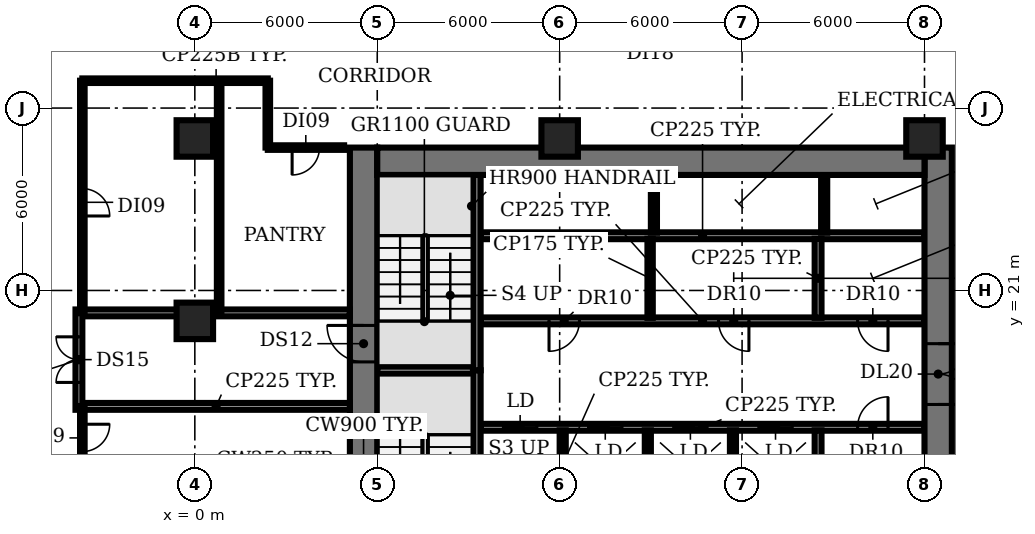
"""IFC4 building model, lengths in metres.
Left out: names, types, materials, properties, quantities, classifications, styles, units other than length and angle.
Written with IfcOpenShell. Run it as: python <this file> out.ifc"""

import sys

from ifc_helpers import new_model, si_unit, direction, frame, frame_2d, origin, origin_2d, place, context, subcontext, project, spatial, rectangle, extrude, element, fill, save


model = new_model("IFC4")
c1 = context("Model", 3, precision=1e-05, world=origin(), true_north=direction((0.0, 1.0)))
c2 = subcontext(c1, "Body", "Model", "MODEL_VIEW")
j1 = project(units=[si_unit("LENGTHUNIT", "METRE"), si_unit("PLANEANGLEUNIT", "RADIAN")], contexts=[c1])
p1 = place(None, origin())
s1 = spatial("IfcSite", under=j1, at=p1, CompositionType="ELEMENT")
p2 = place(p1, origin())
s2 = spatial("IfcBuilding", under=s1, at=p2, CompositionType="ELEMENT")
p3 = place(p2, origin())
s3 = spatial("IfcBuildingStorey", under=s2, at=p3, CompositionType="ELEMENT", Elevation=0.0)
for number, where, z_axis, x_axis in (
    (1, (0.0, 20.0, 0.0), (0.0, 0.0, 1.0), (1.0, 0.0, 0.0)),
    (2, (0.0, 26.0, 0.0), (0.0, 0.0, 1.0), (1.0, 0.0, 0.0)),
    (3, (12.0, 26.0, 0.0), (0.0, 0.0, 1.0), (1.0, 0.0, 0.0)),
    (4, (24.0, 26.0, 0.0), (0.0, 0.0, 1.0), (1.0, 0.0, 0.0)),
):
    element("IfcColumn", number, at=place(p3, frame(where, z_axis=z_axis, x_axis=x_axis)), inside=s3, PredefinedType="COLUMN", context=c2, shape_type="SweptSolid", body=[
        extrude(rectangle(XDim=1.2, YDim=1.2, at=origin_2d()), origin(), (0.0, 0.0, 1.0), 5.65),
    ])
p4 = place(p3, frame((9.4, 16.5, 0.0), z_axis=(0.0, 0.0, 1.0), x_axis=(1.0, 0.0, 0.0)))
e5 = element("IfcWall", 5, at=p4, inside=s3, PredefinedType="PARTITIONING", context=c2, shape_type="SweptSolid", body=[
    extrude(rectangle(XDim=14.6, YDim=0.225, at=frame_2d((7.3, 0.0))), origin(), (0.0, 0.0, 1.0), 5.65),
])
p5 = place(p4, frame((0.75, 0.0, 0.0)))
e6 = element("IfcOpeningElement", 6, at=p5, cuts=e5, PredefinedType="OPENING", context=c2, shape_type="SweptSolid", body=[
    extrude(rectangle(XDim=1.1, YDim=2.1, at=frame_2d((0.55, 1.05))), frame((0.0, 0.123, 0.0), z_axis=(0.0, -1.0, 0.0), x_axis=(1.0, 0.0, 0.0)), (0.0, 0.0, 1.0), 0.245),
])
p6 = place(p4, frame((3.55, 0.0, 0.0)))
e7 = element("IfcOpeningElement", 7, at=p6, cuts=e5, PredefinedType="OPENING", context=c2, shape_type="SweptSolid", body=[
    extrude(rectangle(XDim=1.1, YDim=2.1, at=frame_2d((0.55, 1.05))), frame((0.0, 0.123, 0.0), z_axis=(0.0, -1.0, 0.0), x_axis=(1.0, 0.0, 0.0)), (0.0, 0.0, 1.0), 0.245),
])
p7 = place(p4, frame((6.35, 0.0, 0.0)))
e8 = element("IfcOpeningElement", 8, at=p7, cuts=e5, PredefinedType="OPENING", context=c2, shape_type="SweptSolid", body=[
    extrude(rectangle(XDim=1.1, YDim=2.1, at=frame_2d((0.55, 1.05))), frame((0.0, 0.123, 0.0), z_axis=(0.0, -1.0, 0.0), x_axis=(1.0, 0.0, 0.0)), (0.0, 0.0, 1.0), 0.245),
])
p8 = place(p4, frame((9.15, 0.0, 0.0)))
e9 = element("IfcOpeningElement", 9, at=p8, cuts=e5, PredefinedType="OPENING", context=c2, shape_type="SweptSolid", body=[
    extrude(rectangle(XDim=1.1, YDim=2.1, at=frame_2d((0.55, 1.05))), frame((0.0, 0.123, 0.0), z_axis=(0.0, -1.0, 0.0), x_axis=(1.0, 0.0, 0.0)), (0.0, 0.0, 1.0), 0.245),
])
p9 = place(p4, frame((12.4, 0.0, 0.0)))
e10 = element("IfcOpeningElement", 10, at=p9, cuts=e5, PredefinedType="OPENING", context=c2, shape_type="SweptSolid", body=[
    extrude(rectangle(XDim=1.0, YDim=2.1, at=frame_2d((0.5, 1.05))), frame((0.0, 0.123, 0.0), z_axis=(0.0, -1.0, 0.0), x_axis=(1.0, 0.0, 0.0)), (0.0, 0.0, 1.0), 0.245),
])
p10 = place(p3, frame((6.0, 18.375, 0.0), z_axis=(0.0, 0.0, 1.0), x_axis=(1.0, 0.0, 0.0)))
e11 = element("IfcWall", 11, at=p10, inside=s3, PredefinedType="SHEAR", context=c2, shape_type="SweptSolid", body=[
    extrude(rectangle(XDim=3.15, YDim=0.25, at=frame_2d((1.575, 0.0))), origin(), (0.0, 0.0, 1.0), 5.65),
])
p11 = place(p3, frame((24.0, 20.0, 0.0), z_axis=(0.0, 0.0, 1.0), x_axis=(-1.0, 0.0, 0.0)))
e12 = element("IfcWall", 12, at=p11, inside=s3, PredefinedType="PARTITIONING", context=c2, shape_type="SweptSolid", body=[
    extrude(rectangle(XDim=14.6, YDim=0.225, at=frame_2d((7.3, 0.0))), origin(), (0.0, 0.0, 1.0), 5.65),
])
p12 = place(p11, frame((11.35, 0.0, 0.0)))
e13 = element("IfcOpeningElement", 13, at=p12, cuts=e12, PredefinedType="OPENING", context=c2, shape_type="SweptSolid", body=[
    extrude(rectangle(XDim=1.0, YDim=2.1, at=frame_2d((0.5, 1.05))), frame((0.0, 0.123, 0.0), z_axis=(0.0, -1.0, 0.0), x_axis=(1.0, 0.0, 0.0)), (0.0, 0.0, 1.0), 0.245),
])
p13 = place(p11, frame((5.775, 0.0, 0.0)))
e14 = element("IfcOpeningElement", 14, at=p13, cuts=e12, PredefinedType="OPENING", context=c2, shape_type="SweptSolid", body=[
    extrude(rectangle(XDim=1.0, YDim=2.1, at=frame_2d((0.5, 1.05))), frame((0.0, 0.123, 0.0), z_axis=(0.0, -1.0, 0.0), x_axis=(1.0, 0.0, 0.0)), (0.0, 0.0, 1.0), 0.245),
])
p14 = place(p11, frame((1.2, 0.0, 0.0)))
e15 = element("IfcOpeningElement", 15, at=p14, cuts=e12, PredefinedType="OPENING", context=c2, shape_type="SweptSolid", body=[
    extrude(rectangle(XDim=1.0, YDim=2.1, at=frame_2d((0.5, 1.05))), frame((0.0, 0.123, 0.0), z_axis=(0.0, -1.0, 0.0), x_axis=(1.0, 0.0, 0.0)), (0.0, 0.0, 1.0), 0.245),
])
p15 = place(p3, frame((9.4, 22.8, 0.0), z_axis=(0.0, 0.0, 1.0), x_axis=(1.0, 0.0, 0.0)))
e16 = element("IfcWall", 16, at=p15, inside=s3, PredefinedType="PARTITIONING", context=c2, shape_type="SweptSolid", body=[
    extrude(rectangle(XDim=14.6, YDim=0.225, at=frame_2d((7.3, 0.0))), origin(), (0.0, 0.0, 1.0), 5.65),
])
p16 = place(p3, frame((9.275, 18.375, 0.0), z_axis=(0.0, 0.0, 1.0), x_axis=(0.0, -1.0, 0.0)))
e17 = element("IfcWall", 17, at=p16, inside=s3, PredefinedType="SHEAR", context=c2, shape_type="SweptSolid", body=[
    extrude(rectangle(XDim=6.55, YDim=0.25, at=frame_2d((3.275, 0.0))), origin(), (0.0, 0.0, 1.0), 5.65),
])
p17 = place(p16, frame((5.075, 0.0, 0.0)))
e18 = element("IfcOpeningElement", 18, at=p17, cuts=e17, PredefinedType="OPENING", context=c2, shape_type="SweptSolid", body=[
    extrude(rectangle(XDim=1.0, YDim=2.1, at=frame_2d((0.5, 1.05))), frame((0.0, 0.135, 0.0), z_axis=(0.0, -1.0, 0.0), x_axis=(1.0, 0.0, 0.0)), (0.0, 0.0, 1.0), 0.27),
])
p18 = place(p3, frame((9.275, 18.375, 0.0), z_axis=(0.0, 0.0, 1.0), x_axis=(0.0, 1.0, 0.0)))
e19 = element("IfcWall", 19, at=p18, inside=s3, PredefinedType="SHEAR", context=c2, shape_type="SweptSolid", body=[
    extrude(rectangle(XDim=6.425, YDim=0.25, at=frame_2d((3.212, 0.0))), origin(), (0.0, 0.0, 1.0), 5.65),
])
for number, where, z_axis, x_axis in (
    (20, (12.1, 13.8, 0.0), (0.0, 0.0, 1.0), (0.0, 1.0, 0.0)),
    (21, (14.9, 13.8, 0.0), (0.0, 0.0, 1.0), (0.0, 1.0, 0.0)),
):
    element("IfcWall", number, at=place(p3, frame(where, z_axis=z_axis, x_axis=x_axis)), inside=s3, PredefinedType="SOLIDWALL", context=c2, shape_type="SweptSolid", body=[
        extrude(rectangle(XDim=2.6, YDim=0.2, at=frame_2d((1.3, 0.0))), origin(), (0.0, 0.0, 1.0), 5.65),
    ])
p19 = place(p3, frame((14.975, 20.1, 0.0), z_axis=(0.0, 0.0, 1.0), x_axis=(0.0, 1.0, 0.0)))
e22 = element("IfcWall", 22, at=p19, inside=s3, PredefinedType="PARTITIONING", context=c2, shape_type="SweptSolid", body=[
    extrude(rectangle(XDim=2.6, YDim=0.175, at=frame_2d((1.3, 0.0))), origin(), (0.0, 0.0, 1.0), 5.65),
])
p20 = place(p3, frame((15.1, 22.9, 0.0), z_axis=(0.0, 0.0, 1.0), x_axis=(0.0, 1.0, 0.0)))
e23 = element("IfcWall", 23, at=p20, inside=s3, PredefinedType="SHEAR", context=c2, shape_type="SweptSolid", body=[
    extrude(rectangle(XDim=1.9, YDim=0.2, at=frame_2d((0.95, 0.0))), origin(), (0.0, 0.0, 1.0), 5.65),
])
p21 = place(p3, frame((17.7, 13.8, 0.0), z_axis=(0.0, 0.0, 1.0), x_axis=(0.0, 1.0, 0.0)))
e24 = element("IfcWall", 24, at=p21, inside=s3, PredefinedType="SOLIDWALL", context=c2, shape_type="SweptSolid", body=[
    extrude(rectangle(XDim=2.6, YDim=0.2, at=frame_2d((1.3, 0.0))), origin(), (0.0, 0.0, 1.0), 5.65),
])
for number, where, z_axis, x_axis in (
    (25, (20.5, 13.8, 0.0), (0.0, 0.0, 1.0), (0.0, 1.0, 0.0)),
    (26, (20.5, 20.1, 0.0), (0.0, 0.0, 1.0), (0.0, 1.0, 0.0)),
):
    element("IfcWall", number, at=place(p3, frame(where, z_axis=z_axis, x_axis=x_axis)), inside=s3, PredefinedType="PARTITIONING", context=c2, shape_type="SweptSolid", body=[
        extrude(rectangle(XDim=2.6, YDim=0.225, at=frame_2d((1.3, 0.0))), origin(), (0.0, 0.0, 1.0), 5.65),
    ])
p22 = place(p3, frame((20.7, 22.9, 0.0), z_axis=(0.0, 0.0, 1.0), x_axis=(0.0, 1.0, 0.0)))
e27 = element("IfcWall", 27, at=p22, inside=s3, PredefinedType="SHEAR", context=c2, shape_type="SweptSolid", body=[
    extrude(rectangle(XDim=1.9, YDim=0.2, at=frame_2d((0.95, 0.0))), origin(), (0.0, 0.0, 1.0), 5.65),
])
p23 = place(p3, frame((5.55, 4.5, 0.0), z_axis=(0.0, 0.0, 1.0), x_axis=(0.0, 1.0, 0.0)))
e28 = element("IfcWall", 28, at=p23, inside=s3, PredefinedType="SHEAR", context=c2, shape_type="SweptSolid", body=[
    extrude(rectangle(XDim=21.2, YDim=0.9, at=frame_2d((10.6, 0.0))), origin(), (0.0, 0.0, 1.0), 5.65),
])
p24 = place(p23, frame((7.6, 0.0, 0.0)))
e29 = element("IfcOpeningElement", 29, at=p24, cuts=e28, PredefinedType="OPENING", context=c2, shape_type="SweptSolid", body=[
    extrude(rectangle(XDim=1.2, YDim=2.1, at=frame_2d((0.6, 1.05))), frame((0.0, 0.46, 0.0), z_axis=(0.0, -1.0, 0.0), x_axis=(1.0, 0.0, 0.0)), (0.0, 0.0, 1.0), 0.92),
])
p25 = place(p23, frame((14.15, 0.0, 0.0)))
e30 = element("IfcOpeningElement", 30, at=p25, cuts=e28, PredefinedType="OPENING", context=c2, shape_type="SweptSolid", body=[
    extrude(rectangle(XDim=1.2, YDim=2.1, at=frame_2d((0.6, 1.05))), frame((0.0, 0.46, 0.0), z_axis=(0.0, -1.0, 0.0), x_axis=(1.0, 0.0, 0.0)), (0.0, 0.0, 1.0), 0.92),
])
p26 = place(p3, frame((24.45, 25.7, 0.0), z_axis=(0.0, 0.0, 1.0), x_axis=(0.0, -1.0, 0.0)))
e31 = element("IfcWall", 31, at=p26, inside=s3, PredefinedType="SHEAR", context=c2, shape_type="SweptSolid", body=[
    extrude(rectangle(XDim=21.2, YDim=0.9, at=frame_2d((10.6, 0.0))), origin(), (0.0, 0.0, 1.0), 5.65),
])
p27 = place(p26, frame((12.45, 0.0, 0.0)))
e32 = element("IfcOpeningElement", 32, at=p27, cuts=e31, PredefinedType="OPENING", context=c2, shape_type="SweptSolid", body=[
    extrude(rectangle(XDim=0.9, YDim=2.1, at=frame_2d((0.45, 1.05))), frame((0.0, 0.46, 0.0), z_axis=(0.0, -1.0, 0.0), x_axis=(1.0, 0.0, 0.0)), (0.0, 0.0, 1.0), 0.92),
])
p28 = place(p26, frame((6.45, 0.0, 0.0)))
e33 = element("IfcOpeningElement", 33, at=p28, cuts=e31, PredefinedType="OPENING", context=c2, shape_type="SweptSolid", body=[
    extrude(rectangle(XDim=2.0, YDim=2.1, at=frame_2d((1.0, 1.05))), frame((0.0, 0.46, 0.0), z_axis=(0.0, -1.0, 0.0), x_axis=(1.0, 0.0, 0.0)), (0.0, 0.0, 1.0), 0.92),
])
p29 = place(p3, frame((6.0, 25.25, 0.0), z_axis=(0.0, 0.0, 1.0), x_axis=(1.0, 0.0, 0.0)))
e34 = element("IfcWall", 34, at=p29, inside=s3, PredefinedType="SHEAR", context=c2, shape_type="SweptSolid", body=[
    extrude(rectangle(XDim=18.0, YDim=0.9, at=frame_2d((9.0, 0.0))), origin(), (0.0, 0.0, 1.0), 5.65),
])
p30 = place(p3, frame((-3.7, 17.188, 0.0), z_axis=(0.0, 0.0, 1.0), x_axis=(1.0, 0.0, 0.0)))
e35 = element("IfcWall", 35, at=p30, inside=s3, PredefinedType="PARTITIONING", context=c2, shape_type="SweptSolid", body=[
    extrude(rectangle(XDim=8.8, YDim=0.225, at=frame_2d((4.4, 0.0))), origin(), (0.0, 0.0, 1.0), 5.65),
])
p31 = place(p3, frame((5.1, 20.262, 0.0), z_axis=(0.0, 0.0, 1.0), x_axis=(-1.0, 0.0, 0.0)))
e36 = element("IfcWall", 36, at=p31, inside=s3, PredefinedType="PARTITIONING", context=c2, shape_type="SweptSolid", body=[
    extrude(rectangle(XDim=8.8, YDim=0.225, at=frame_2d((4.4, 0.0))), origin(), (0.0, 0.0, 1.0), 4.65),
])
p32 = place(p3, frame((-3.812, 17.075, 0.0), z_axis=(0.0, 0.0, 1.0), x_axis=(0.0, 1.0, 0.0)))
e37 = element("IfcWall", 37, at=p32, inside=s3, PredefinedType="PARTITIONING", context=c2, shape_type="SweptSolid", body=[
    extrude(rectangle(XDim=3.3, YDim=0.225, at=frame_2d((1.65, 0.0))), origin(), (0.0, 0.0, 1.0), 5.65),
])
p33 = place(p32, frame((0.9, 0.0, 0.0)))
e38 = element("IfcOpeningElement", 38, at=p33, cuts=e37, PredefinedType="OPENING", context=c2, shape_type="SweptSolid", body=[
    extrude(rectangle(XDim=1.5, YDim=2.1, at=frame_2d((0.75, 1.05))), frame((0.0, 0.123, 0.0), z_axis=(0.0, -1.0, 0.0), x_axis=(1.0, 0.0, 0.0)), (0.0, 0.0, 1.0), 0.245),
])
p34 = place(p3, frame((-3.7, 17.2, 0.0), z_axis=(0.0, 0.0, 1.0), x_axis=(0.0, -1.0, 0.0)))
e39 = element("IfcWall", 39, at=p34, inside=s3, PredefinedType="PARTITIONING", context=c2, shape_type="SweptSolid", body=[
    extrude(rectangle(XDim=3.5, YDim=0.15, at=frame_2d((1.75, 0.0))), origin(), (0.0, 0.0, 1.0), 4.53),
])
p35 = place(p34, frame((0.6, 0.0, 0.0)))
e40 = element("IfcOpeningElement", 40, at=p35, cuts=e39, PredefinedType="OPENING", context=c2, shape_type="SweptSolid", body=[
    extrude(rectangle(XDim=0.9, YDim=2.1, at=frame_2d((0.45, 1.05))), frame((0.0, 0.085, 0.0), z_axis=(0.0, -1.0, 0.0), x_axis=(1.0, 0.0, 0.0)), (0.0, 0.0, 1.0), 0.17),
])
p36 = place(p3, frame((-3.7, 27.9, 0.0), z_axis=(0.0, 0.0, 1.0), x_axis=(0.0, -1.0, 0.0)))
e41 = element("IfcWall", 41, at=p36, inside=s3, PredefinedType="PARTITIONING", context=c2, shape_type="SweptSolid", body=[
    extrude(rectangle(XDim=7.65, YDim=0.15, at=frame_2d((3.825, 0.0))), origin(), (0.0, 0.0, 1.0), 4.53),
])
p37 = place(p36, frame((3.55, 0.0, 0.0)))
e42 = element("IfcOpeningElement", 42, at=p37, cuts=e41, PredefinedType="OPENING", context=c2, shape_type="SweptSolid", body=[
    extrude(rectangle(XDim=0.9, YDim=2.1, at=frame_2d((0.45, 1.05))), frame((0.0, 0.085, 0.0), z_axis=(0.0, -1.0, 0.0), x_axis=(1.0, 0.0, 0.0)), (0.0, 0.0, 1.0), 0.17),
])
p38 = place(p3, frame((-3.7, 27.9, 0.0), z_axis=(0.0, 0.0, 1.0), x_axis=(1.0, 0.0, 0.0)))
e43 = element("IfcWall", 43, at=p38, inside=s3, PredefinedType="PARTITIONING", context=c2, shape_type="SweptSolid", body=[
    extrude(rectangle(XDim=6.1, YDim=0.15, at=frame_2d((3.05, 0.0))), origin(), (0.0, 0.0, 1.0), 4.53),
])
p39 = place(p3, frame((0.8, 20.25, 0.0), z_axis=(0.0, 0.0, 1.0), x_axis=(0.0, 1.0, 0.0)))
e44 = element("IfcWall", 44, at=p39, inside=s3, PredefinedType="PARTITIONING", context=c2, shape_type="SweptSolid", body=[
    extrude(rectangle(XDim=7.65, YDim=0.15, at=frame_2d((3.825, 0.0))), origin(), (0.0, 0.0, 1.0), 4.53),
])
p40 = place(p3, frame((2.4, 25.7, 0.0), z_axis=(0.0, 0.0, 1.0), x_axis=(0.0, 1.0, 0.0)))
e45 = element("IfcWall", 45, at=p40, inside=s3, PredefinedType="PARTITIONING", context=c2, shape_type="SweptSolid", body=[
    extrude(rectangle(XDim=2.2, YDim=0.15, at=frame_2d((1.1, 0.0))), origin(), (0.0, 0.0, 1.0), 4.53),
])
p41 = place(p3, frame((4.91, 25.7, 0.0), z_axis=(0.0, 0.0, 1.0), x_axis=(-1.0, 0.0, 0.0)))
e46 = element("IfcWall", 46, at=p41, inside=s3, PredefinedType="PARTITIONING", context=c2, shape_type="SweptSolid", body=[
    extrude(rectangle(XDim=2.51, YDim=0.15, at=frame_2d((1.255, 0.0))), origin(), (0.0, 0.0, 1.0), 4.53),
])
p42 = place(p41, frame((0.81, 0.0, 0.0)))
e47 = element("IfcOpeningElement", 47, at=p42, cuts=e46, PredefinedType="OPENING", context=c2, shape_type="SweptSolid", body=[
    extrude(rectangle(XDim=0.9, YDim=2.1, at=frame_2d((0.45, 1.05))), frame((0.0, 0.085, 0.0), z_axis=(0.0, -1.0, 0.0), x_axis=(1.0, 0.0, 0.0)), (0.0, 0.0, 1.0), 0.17),
])
p43 = place(p5, origin())
e48 = element("IfcDoor", 48, at=p43, inside=s3, OperationType="DOUBLE_DOOR_SLIDING", PredefinedType="DOOR", context=c2, shape_type="SweptSolid", body=[
    extrude(rectangle(XDim=1.1, YDim=2.1, at=frame_2d((0.55, 1.05))), frame((0.0, 0.025, 0.0), z_axis=(0.0, -1.0, 0.0), x_axis=(1.0, 0.0, 0.0)), (0.0, 0.0, 1.0), 0.05),
])
fill(e6, e48)
p44 = place(p6, origin())
e49 = element("IfcDoor", 49, at=p44, inside=s3, OperationType="DOUBLE_DOOR_SLIDING", PredefinedType="DOOR", context=c2, shape_type="SweptSolid", body=[
    extrude(rectangle(XDim=1.1, YDim=2.1, at=frame_2d((0.55, 1.05))), frame((0.0, 0.025, 0.0), z_axis=(0.0, -1.0, 0.0), x_axis=(1.0, 0.0, 0.0)), (0.0, 0.0, 1.0), 0.05),
])
fill(e7, e49)
p45 = place(p7, origin())
e50 = element("IfcDoor", 50, at=p45, inside=s3, OperationType="DOUBLE_DOOR_SLIDING", PredefinedType="DOOR", context=c2, shape_type="SweptSolid", body=[
    extrude(rectangle(XDim=1.1, YDim=2.1, at=frame_2d((0.55, 1.05))), frame((0.0, 0.025, 0.0), z_axis=(0.0, -1.0, 0.0), x_axis=(1.0, 0.0, 0.0)), (0.0, 0.0, 1.0), 0.05),
])
fill(e8, e50)
p46 = place(p8, origin())
e51 = element("IfcDoor", 51, at=p46, inside=s3, OperationType="DOUBLE_DOOR_SLIDING", PredefinedType="DOOR", context=c2, shape_type="SweptSolid", body=[
    extrude(rectangle(XDim=1.1, YDim=2.1, at=frame_2d((0.55, 1.05))), frame((0.0, 0.025, 0.0), z_axis=(0.0, -1.0, 0.0), x_axis=(1.0, 0.0, 0.0)), (0.0, 0.0, 1.0), 0.05),
])
fill(e9, e51)
p47 = place(p9, origin())
e52 = element("IfcDoor", 52, at=p47, inside=s3, OperationType="SINGLE_SWING_RIGHT", PredefinedType="DOOR", context=c2, shape_type="SweptSolid", body=[
    extrude(rectangle(XDim=1.0, YDim=2.1, at=frame_2d((0.5, 1.05))), frame((0.0, 0.025, 0.0), z_axis=(0.0, -1.0, 0.0), x_axis=(1.0, 0.0, 0.0)), (0.0, 0.0, 1.0), 0.05),
])
fill(e10, e52)
p48 = place(p12, origin())
e53 = element("IfcDoor", 53, at=p48, inside=s3, OperationType="SINGLE_SWING_RIGHT", PredefinedType="DOOR", context=c2, shape_type="SweptSolid", body=[
    extrude(rectangle(XDim=1.0, YDim=2.1, at=frame_2d((0.5, 1.05))), frame((0.0, 0.025, 0.0), z_axis=(0.0, -1.0, 0.0), x_axis=(1.0, 0.0, 0.0)), (0.0, 0.0, 1.0), 0.05),
])
fill(e13, e53)
p49 = place(p13, origin())
e54 = element("IfcDoor", 54, at=p49, inside=s3, OperationType="SINGLE_SWING_LEFT", PredefinedType="DOOR", context=c2, shape_type="SweptSolid", body=[
    extrude(rectangle(XDim=1.0, YDim=2.1, at=frame_2d((0.5, 1.05))), frame((0.0, 0.025, 0.0), z_axis=(0.0, -1.0, 0.0), x_axis=(1.0, 0.0, 0.0)), (0.0, 0.0, 1.0), 0.05),
])
fill(e14, e54)
p50 = place(p14, origin())
e55 = element("IfcDoor", 55, at=p50, inside=s3, OperationType="SINGLE_SWING_LEFT", PredefinedType="DOOR", context=c2, shape_type="SweptSolid", body=[
    extrude(rectangle(XDim=1.0, YDim=2.1, at=frame_2d((0.5, 1.05))), frame((0.0, 0.025, 0.0), z_axis=(0.0, -1.0, 0.0), x_axis=(1.0, 0.0, 0.0)), (0.0, 0.0, 1.0), 0.05),
])
fill(e15, e55)
p51 = place(p25, origin())
e56 = element("IfcDoor", 56, at=p51, inside=s3, OperationType="SINGLE_SWING_RIGHT", PredefinedType="DOOR", context=c2, shape_type="SweptSolid", body=[
    extrude(rectangle(XDim=1.2, YDim=2.1, at=frame_2d((0.6, 1.05))), frame((0.0, 0.025, 0.0), z_axis=(0.0, -1.0, 0.0), x_axis=(1.0, 0.0, 0.0)), (0.0, 0.0, 1.0), 0.05),
])
fill(e30, e56)
p52 = place(p28, origin())
e57 = element("IfcDoor", 57, at=p52, inside=s3, OperationType="DOUBLE_DOOR_SINGLE_SWING", PredefinedType="DOOR", context=c2, shape_type="SweptSolid", body=[
    extrude(rectangle(XDim=2.0, YDim=2.1, at=frame_2d((1.0, 1.05))), frame((0.0, 0.025, 0.0), z_axis=(0.0, -1.0, 0.0), x_axis=(1.0, 0.0, 0.0)), (0.0, 0.0, 1.0), 0.05),
])
fill(e33, e57)
p53 = place(p33, origin())
e58 = element("IfcDoor", 58, at=p53, inside=s3, OperationType="DOUBLE_DOOR_SINGLE_SWING", PredefinedType="DOOR", context=c2, shape_type="SweptSolid", body=[
    extrude(rectangle(XDim=1.5, YDim=2.1, at=frame_2d((0.75, 1.05))), frame((0.0, 0.025, 0.0), z_axis=(0.0, -1.0, 0.0), x_axis=(1.0, 0.0, 0.0)), (0.0, 0.0, 1.0), 0.05),
])
fill(e38, e58)
p54 = place(p35, origin())
e59 = element("IfcDoor", 59, at=p54, inside=s3, OperationType="SINGLE_SWING_LEFT", PredefinedType="DOOR", context=c2, shape_type="SweptSolid", body=[
    extrude(rectangle(XDim=0.9, YDim=2.1, at=frame_2d((0.45, 1.05))), frame((0.0, 0.025, 0.0), z_axis=(0.0, -1.0, 0.0), x_axis=(1.0, 0.0, 0.0)), (0.0, 0.0, 1.0), 0.05),
])
fill(e40, e59)
p55 = place(p37, origin())
e60 = element("IfcDoor", 60, at=p55, inside=s3, OperationType="SINGLE_SWING_RIGHT", PredefinedType="DOOR", context=c2, shape_type="SweptSolid", body=[
    extrude(rectangle(XDim=0.9, YDim=2.1, at=frame_2d((0.45, 1.05))), frame((0.0, 0.025, 0.0), z_axis=(0.0, -1.0, 0.0), x_axis=(1.0, 0.0, 0.0)), (0.0, 0.0, 1.0), 0.05),
])
fill(e42, e60)
p56 = place(p42, origin())
e61 = element("IfcDoor", 61, at=p56, inside=s3, OperationType="SINGLE_SWING_RIGHT", PredefinedType="DOOR", context=c2, shape_type="SweptSolid", body=[
    extrude(rectangle(XDim=0.9, YDim=2.1, at=frame_2d((0.45, 1.05))), frame((0.0, 0.025, 0.0), z_axis=(0.0, -1.0, 0.0), x_axis=(1.0, 0.0, 0.0)), (0.0, 0.0, 1.0), 0.05),
])
fill(e47, e61)
save(model, sys.argv[1])
